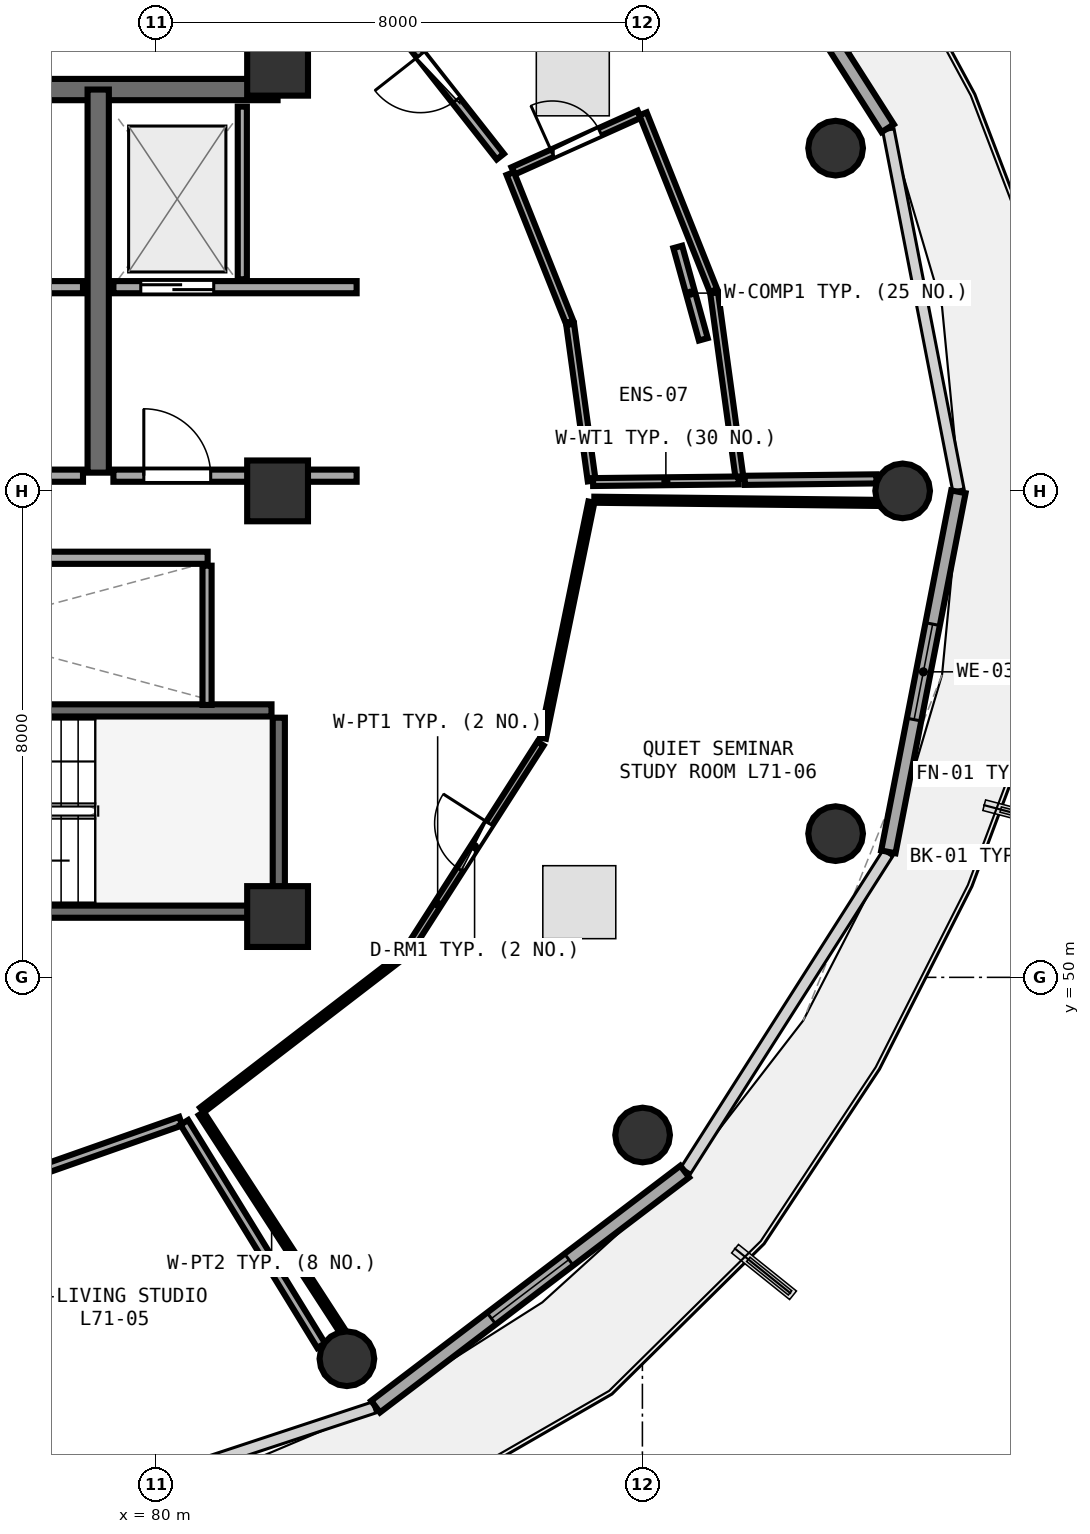
"""IFC4 building model, lengths in metres.
Left out: names, types, materials, properties, quantities, classifications, styles, units other than length and angle.
Written with IfcOpenShell. Run it as: python <this file> out.ifc"""

import sys

from ifc_helpers import new_model, si_unit, direction, frame, frame_2d, origin, origin_2d, place, context, subcontext, project, spatial, rectangle, circle, extrude, element, fill, save


model = new_model("IFC4")
c1 = context("Model", 3, precision=1e-05, world=origin(), true_north=direction((0.0, 1.0)))
c2 = subcontext(c1, "Body", "Model", "MODEL_VIEW")
j1 = project(units=[si_unit("LENGTHUNIT", "METRE"), si_unit("PLANEANGLEUNIT", "RADIAN")], contexts=[c1])
p1 = place(None, origin())
s1 = spatial("IfcSite", under=j1, at=p1, CompositionType="ELEMENT")
p2 = place(p1, origin())
s2 = spatial("IfcBuilding", under=s1, at=p2, CompositionType="ELEMENT")
p3 = place(p2, frame((0.0, 0.0, 278.7)))
s3 = spatial("IfcBuildingStorey", under=s2, at=p3, CompositionType="ELEMENT", Elevation=278.7)
for number, where, z_axis, x_axis in (
    (1, (82.0, 51.0, 0.0), (0.0, 0.0, 1.0), (1.0, 0.0, 0.0)),
    (2, (82.0, 58.0, 0.0), (0.0, 0.0, 1.0), (1.0, 0.0, 0.0)),
    (3, (82.0, 65.0, 0.0), (0.0, 0.0, 1.0), (1.0, 0.0, 0.0)),
):
    element("IfcColumn", number, at=place(p3, frame(where, z_axis=z_axis, x_axis=x_axis)), inside=s3, PredefinedType="PILASTER", context=c2, shape_type="SweptSolid", body=[
        extrude(rectangle(XDim=1.0, YDim=1.0, at=origin_2d()), origin(), (0.0, 0.0, 1.0), 3.75),
    ])
for number, where, z_axis, x_axis in (
    (4, (92.28, 58.0, 0.0), (0.0, 0.0, 1.0), (1.0, 0.0, 0.0)),
    (5, (91.177, 63.636, 0.0), (0.0, 0.0, 1.0), (1.0, 0.0, 0.0)),
    (6, (83.14, 43.728, 0.0), (0.0, 0.0, 1.0), (1.0, 0.0, 0.0)),
    (7, (88.003, 47.407, 0.0), (0.0, 0.0, 1.0), (1.0, 0.0, 0.0)),
    (8, (91.177, 52.364, 0.0), (0.0, 0.0, 1.0), (1.0, 0.0, 0.0)),
):
    element("IfcColumn", number, at=place(p3, frame(where, z_axis=z_axis, x_axis=x_axis)), inside=s3, PredefinedType="COLUMN", context=c2, shape_type="SweptSolid", body=[
        extrude(circle(Radius=0.45, at=origin_2d()), origin(), (0.0, 0.0, 1.0), 3.75),
    ])
p4 = place(p3, frame((92.034, 63.964, 0.0), z_axis=(0.0, 0.0, 1.0), x_axis=(-0.537271968456, 0.843409053728, 0.0)))
e9 = element("IfcWall", 9, at=p4, inside=s3, PredefinedType="SOLIDWALL", context=c2, shape_type="SweptSolid", body=[
    extrude(rectangle(XDim=6.175, YDim=0.24, at=frame_2d((3.087, 0.0))), origin(), (0.0, 0.0, 1.0), 3.475),
])
p5 = place(p4, frame((2.613, 0.0, 0.0)))
e10 = element("IfcOpeningElement", 10, at=p5, cuts=e9, PredefinedType="OPENING", context=c2, shape_type="SweptSolid", body=[
    extrude(rectangle(XDim=0.95, YDim=2.1, at=frame_2d((0.475, 1.05))), frame((0.0, 0.13, 0.0), z_axis=(0.0, -1.0, 0.0), x_axis=(1.0, 0.0, 0.0)), (0.0, 0.0, 1.0), 0.26),
])
p6 = place(p4, frame((3.913, 0.0, 0.85)))
e11 = element("IfcOpeningElement", 11, at=p6, cuts=e9, PredefinedType="OPENING", context=c2, shape_type="SweptSolid", body=[
    extrude(rectangle(XDim=1.2, YDim=1.45, at=frame_2d((0.6, 0.725))), frame((0.0, 0.13, 0.0), z_axis=(0.0, -1.0, 0.0), x_axis=(1.0, 0.0, 0.0)), (0.0, 0.0, 1.0), 0.26),
])
p7 = place(p3, frame((83.612, 42.94, 0.0), z_axis=(0.0, 0.0, 1.0), x_axis=(0.796010444211, 0.605282886514, 0.0)))
e12 = element("IfcWall", 12, at=p7, inside=s3, PredefinedType="SOLIDWALL", context=c2, shape_type="SweptSolid", body=[
    extrude(rectangle(XDim=6.387, YDim=0.24, at=frame_2d((3.194, 0.0))), origin(), (0.0, 0.0, 1.0), 3.475),
])
p8 = place(p7, frame((2.394, 0.0, 0.85)))
e13 = element("IfcOpeningElement", 13, at=p8, cuts=e12, PredefinedType="OPENING", context=c2, shape_type="SweptSolid", body=[
    extrude(rectangle(XDim=1.6, YDim=1.45, at=frame_2d((0.8, 0.725))), frame((0.0, 0.13, 0.0), z_axis=(0.0, -1.0, 0.0), x_axis=(1.0, 0.0, 0.0)), (0.0, 0.0, 1.0), 0.26),
])
p9 = place(p3, frame((92.045, 52.063, 0.0), z_axis=(0.0, 0.0, 1.0), x_axis=(0.190969309115, 0.981596008028, 0.0)))
e14 = element("IfcWall", 14, at=p9, inside=s3, PredefinedType="SOLIDWALL", context=c2, shape_type="SweptSolid", body=[
    extrude(rectangle(XDim=6.033, YDim=0.24, at=frame_2d((3.017, 0.0))), origin(), (0.0, 0.0, 1.0), 3.475),
])
p10 = place(p9, frame((2.216, 0.0, 0.85)))
e15 = element("IfcOpeningElement", 15, at=p10, cuts=e14, PredefinedType="OPENING", context=c2, shape_type="SweptSolid", body=[
    extrude(rectangle(XDim=1.6, YDim=1.45, at=frame_2d((0.8, 0.725))), frame((0.0, 0.13, 0.0), z_axis=(0.0, -1.0, 0.0), x_axis=(1.0, 0.0, 0.0)), (0.0, 0.0, 1.0), 0.26),
])
p11 = place(p3, frame((74.0, 51.08, 0.0), z_axis=(0.0, 0.0, 1.0), x_axis=(1.0, 0.0, 0.0)))
e16 = element("IfcWall", 16, at=p11, inside=s3, PredefinedType="SHEAR", context=c2, shape_type="SweptSolid", body=[
    extrude(rectangle(XDim=7.9, YDim=0.2, at=frame_2d((3.95, 0.0))), origin(), (0.0, 0.0, 1.0), 3.49),
])
p12 = place(p11, frame((1.12, 0.0, 0.0)))
e17 = element("IfcOpeningElement", 17, at=p12, cuts=e16, PredefinedType="OPENING", context=c2, shape_type="SweptSolid", body=[
    extrude(rectangle(XDim=1.05, YDim=2.1, at=frame_2d((0.525, 1.05))), frame((0.0, 0.11, 0.0), z_axis=(0.0, -1.0, 0.0), x_axis=(1.0, 0.0, 0.0)), (0.0, 0.0, 1.0), 0.22),
])
p13 = place(p3, frame((82.02, 51.2, 0.0), z_axis=(0.0, 0.0, 1.0), x_axis=(0.0, 1.0, 0.0)))
e18 = element("IfcWall", 18, at=p13, inside=s3, PredefinedType="SHEAR", context=c2, shape_type="SweptSolid", body=[
    extrude(rectangle(XDim=3.07, YDim=0.2, at=frame_2d((1.535, 0.0))), origin(), (0.0, 0.0, 1.0), 3.49),
])
p14 = place(p3, frame((81.9, 54.39, 0.0), z_axis=(0.0, 0.0, 1.0), x_axis=(-1.0, 0.0, 0.0)))
e19 = element("IfcWall", 19, at=p14, inside=s3, PredefinedType="SHEAR", context=c2, shape_type="SweptSolid", body=[
    extrude(rectangle(XDim=8.46, YDim=0.2, at=frame_2d((4.23, 0.0))), origin(), (0.0, 0.0, 1.0), 3.49),
])
p15 = place(p3, frame((74.0, 64.6, 0.0), z_axis=(0.0, 0.0, 1.0), x_axis=(1.0, 0.0, 0.0)))
e20 = element("IfcWall", 20, at=p15, inside=s3, PredefinedType="SHEAR", context=c2, shape_type="SweptSolid", body=[
    extrude(rectangle(XDim=8.0, YDim=0.35, at=frame_2d((4.0, 0.0))), origin(), (0.0, 0.0, 1.0), 3.49),
])
p16 = place(p3, frame((79.05, 58.3, 0.0), z_axis=(0.0, 0.0, 1.0), x_axis=(0.0, 1.0, 0.0)))
e21 = element("IfcWall", 21, at=p16, inside=s3, PredefinedType="SHEAR", context=c2, shape_type="SweptSolid", body=[
    extrude(rectangle(XDim=6.3, YDim=0.35, at=frame_2d((3.15, 0.0))), origin(), (0.0, 0.0, 1.0), 3.49),
])
p17 = place(p3, frame((74.2, 61.35, 0.0), z_axis=(0.0, 0.0, 1.0), x_axis=(1.0, 0.0, 0.0)))
e22 = element("IfcWall", 22, at=p17, inside=s3, PredefinedType="SOLIDWALL", context=c2, shape_type="SweptSolid", body=[
    extrude(rectangle(XDim=4.6, YDim=0.2, at=frame_2d((2.3, 0.0))), origin(), (0.0, 0.0, 1.0), 3.48),
])
p18 = place(p17, frame((0.52, 0.0, 0.0)))
e23 = element("IfcOpeningElement", 23, at=p18, cuts=e22, PredefinedType="OPENING", context=c2, shape_type="SweptSolid", body=[
    extrude(rectangle(XDim=1.2, YDim=2.15, at=frame_2d((0.6, 1.075))), frame((0.0, 0.11, 0.0), z_axis=(0.0, -1.0, 0.0), x_axis=(1.0, 0.0, 0.0)), (0.0, 0.0, 1.0), 0.22),
])
p19 = place(p3, frame((79.3, 61.35, 0.0), z_axis=(0.0, 0.0, 1.0), x_axis=(1.0, 0.0, 0.0)))
e24 = element("IfcWall", 24, at=p19, inside=s3, PredefinedType="SOLIDWALL", context=c2, shape_type="SweptSolid", body=[
    extrude(rectangle(XDim=4.0, YDim=0.2, at=frame_2d((2.0, 0.0))), origin(), (0.0, 0.0, 1.0), 2.775),
])
p20 = place(p19, frame((0.45, 0.0, 0.0)))
e25 = element("IfcOpeningElement", 25, at=p20, cuts=e24, PredefinedType="OPENING", context=c2, shape_type="SweptSolid", body=[
    extrude(rectangle(XDim=1.2, YDim=2.15, at=frame_2d((0.6, 1.075))), frame((0.0, 0.11, 0.0), z_axis=(0.0, -1.0, 0.0), x_axis=(1.0, 0.0, 0.0)), (0.0, 0.0, 1.0), 0.22),
])
p21 = place(p3, frame((81.42, 61.48, 0.0), z_axis=(0.0, 0.0, 1.0), x_axis=(0.0, 1.0, 0.0)))
e26 = element("IfcWall", 26, at=p21, inside=s3, PredefinedType="PARTITIONING", context=c2, shape_type="SweptSolid", body=[
    extrude(rectangle(XDim=2.84, YDim=0.15, at=frame_2d((1.42, 0.0))), origin(), (0.0, 0.0, 1.0), 3.48),
])
p22 = place(p3, frame((74.2, 58.25, 0.0), z_axis=(0.0, 0.0, 1.0), x_axis=(1.0, 0.0, 0.0)))
e27 = element("IfcWall", 27, at=p22, inside=s3, PredefinedType="SOLIDWALL", context=c2, shape_type="SweptSolid", body=[
    extrude(rectangle(XDim=4.6, YDim=0.2, at=frame_2d((2.3, 0.0))), origin(), (0.0, 0.0, 1.0), 3.48),
])
p23 = place(p22, frame((1.8, 0.0, 0.0)))
e28 = element("IfcOpeningElement", 28, at=p23, cuts=e27, PredefinedType="OPENING", context=c2, shape_type="SweptSolid", body=[
    extrude(rectangle(XDim=1.1, YDim=2.1, at=frame_2d((0.55, 1.05))), frame((0.0, 0.11, 0.0), z_axis=(0.0, -1.0, 0.0), x_axis=(1.0, 0.0, 0.0)), (0.0, 0.0, 1.0), 0.22),
])
p24 = place(p3, frame((79.3, 58.25, 0.0), z_axis=(0.0, 0.0, 1.0), x_axis=(1.0, 0.0, 0.0)))
e29 = element("IfcWall", 29, at=p24, inside=s3, PredefinedType="SOLIDWALL", context=c2, shape_type="SweptSolid", body=[
    extrude(rectangle(XDim=4.0, YDim=0.2, at=frame_2d((2.0, 0.0))), origin(), (0.0, 0.0, 1.0), 2.775),
])
p25 = place(p24, frame((0.5, 0.0, 0.0)))
e30 = element("IfcOpeningElement", 30, at=p25, cuts=e29, PredefinedType="OPENING", context=c2, shape_type="SweptSolid", body=[
    extrude(rectangle(XDim=1.1, YDim=2.1, at=frame_2d((0.55, 1.05))), frame((0.0, 0.11, 0.0), z_axis=(0.0, -1.0, 0.0), x_axis=(1.0, 0.0, 0.0)), (0.0, 0.0, 1.0), 0.22),
])
p26 = place(p3, frame((72.45, 56.9, 0.0), z_axis=(0.0, 0.0, 1.0), x_axis=(1.0, 0.0, 0.0)))
e31 = element("IfcWall", 31, at=p26, inside=s3, PredefinedType="SOLIDWALL", context=c2, shape_type="SweptSolid", body=[
    extrude(rectangle(XDim=8.4, YDim=0.2, at=frame_2d((4.2, 0.0))), origin(), (0.0, 0.0, 1.0), 3.48),
])
p27 = place(p26, frame((0.4, 0.0, 0.0)))
e32 = element("IfcOpeningElement", 32, at=p27, cuts=e31, PredefinedType="OPENING", context=c2, shape_type="SweptSolid", body=[
    extrude(rectangle(XDim=1.1, YDim=2.1, at=frame_2d((0.55, 1.05))), frame((0.0, 0.11, 0.0), z_axis=(0.0, -1.0, 0.0), x_axis=(1.0, 0.0, 0.0)), (0.0, 0.0, 1.0), 0.22),
])
p28 = place(p26, frame((2.4, 0.0, 0.0)))
e33 = element("IfcOpeningElement", 33, at=p28, cuts=e31, PredefinedType="OPENING", context=c2, shape_type="SweptSolid", body=[
    extrude(rectangle(XDim=1.1, YDim=2.1, at=frame_2d((0.55, 1.05))), frame((0.0, 0.11, 0.0), z_axis=(0.0, -1.0, 0.0), x_axis=(1.0, 0.0, 0.0)), (0.0, 0.0, 1.0), 0.22),
])
p29 = place(p3, frame((80.84, 54.48, 0.0), z_axis=(0.0, 0.0, 1.0), x_axis=(0.0, 1.0, 0.0)))
e34 = element("IfcWall", 34, at=p29, inside=s3, PredefinedType="PARTITIONING", context=c2, shape_type="SweptSolid", body=[
    extrude(rectangle(XDim=2.29, YDim=0.15, at=frame_2d((1.145, 0.0))), origin(), (0.0, 0.0, 1.0), 3.48),
])
p30 = place(p3, frame((84.156, 50.458, 0.0), z_axis=(0.0, 0.0, 1.0), x_axis=(0.539324099435, 0.842098281538, 0.0)))
e35 = element("IfcWall", 35, at=p30, inside=s3, PredefinedType="PARTITIONING", context=c2, shape_type="SweptSolid", body=[
    extrude(rectangle(XDim=4.022, YDim=0.12, at=frame_2d((2.011, 0.0))), origin(), (0.0, 0.0, 1.0), 3.075),
])
p31 = place(p30, frame((1.561, 0.0, 0.0)))
e36 = element("IfcOpeningElement", 36, at=p31, cuts=e35, PredefinedType="OPENING", context=c2, shape_type="SweptSolid", body=[
    extrude(rectangle(XDim=0.9, YDim=2.08, at=frame_2d((0.45, 1.04))), frame((0.0, 0.07, 0.0), z_axis=(0.0, -1.0, 0.0), x_axis=(1.0, 0.0, 0.0)), (0.0, 0.0, 1.0), 0.14),
])
p32 = place(p3, frame((85.874, 63.263, 0.0), z_axis=(0.0, 0.0, 1.0), x_axis=(0.912228594958, 0.409681572127, 0.0)))
e37 = element("IfcWall", 37, at=p32, inside=s3, PredefinedType="PLUMBINGWALL", context=c2, shape_type="SweptSolid", body=[
    extrude(rectangle(XDim=2.274, YDim=0.13, at=frame_2d((1.137, 0.0))), origin(), (0.0, 0.0, 1.0), 3.075),
])
p33 = place(p32, frame((0.707, 0.0, 0.0)))
e38 = element("IfcOpeningElement", 38, at=p33, cuts=e37, PredefinedType="OPENING", context=c2, shape_type="SweptSolid", body=[
    extrude(rectangle(XDim=0.86, YDim=2.05, at=frame_2d((0.43, 1.025))), frame((0.0, 0.075, 0.0), z_axis=(0.0, -1.0, 0.0), x_axis=(1.0, 0.0, 0.0)), (0.0, 0.0, 1.0), 0.15),
])
p34 = place(p3, frame((85.663, 63.497, 0.0), z_axis=(0.0, 0.0, 1.0), x_axis=(-0.618216128683, 0.786008154052, 0.0)))
e39 = element("IfcWall", 39, at=p34, inside=s3, PredefinedType="PARTITIONING", context=c2, shape_type="SweptSolid", body=[
    extrude(rectangle(XDim=3.306, YDim=0.15, at=frame_2d((1.653, 0.0))), origin(), (0.0, 0.0, 1.0), 3.075),
])
p35 = place(p34, frame((1.178, 0.0, 0.0)))
e40 = element("IfcOpeningElement", 40, at=p35, cuts=e39, PredefinedType="OPENING", context=c2, shape_type="SweptSolid", body=[
    extrude(rectangle(XDim=0.95, YDim=2.08, at=frame_2d((0.475, 1.04))), frame((0.0, 0.085, 0.0), z_axis=(0.0, -1.0, 0.0), x_axis=(1.0, 0.0, 0.0)), (0.0, 0.0, 1.0), 0.17),
])
p36 = place(p3, frame((77.072, 46.462, 0.0), z_axis=(0.0, 0.0, 1.0), x_axis=(0.943334007166, 0.331844769319, 0.0)))
e41 = element("IfcWall", 41, at=p36, inside=s3, PredefinedType="PARTITIONING", context=c2, shape_type="SweptSolid", body=[
    extrude(rectangle(XDim=3.536, YDim=0.15, at=frame_2d((1.768, 0.0))), origin(), (0.0, 0.0, 1.0), 3.48),
])
p37 = place(p3, frame((80.466, 47.615, 0.0), z_axis=(0.0, 0.0, 1.0), x_axis=(0.522784059663, -0.852465147066, 0.0)))
e42 = element("IfcWall", 42, at=p37, inside=s3, PredefinedType="PARTITIONING", context=c2, shape_type="SweptSolid", body=[
    extrude(rectangle(XDim=4.306, YDim=0.15, at=frame_2d((2.153, 0.0))), origin(), (0.0, 0.0, 1.0), 3.175),
])
p38 = place(p3, frame((80.756, 47.818, 0.0), z_axis=(0.0, 0.0, 1.0), x_axis=(0.792820246885, 0.609455540733, 0.0)))
e43 = element("IfcWall", 43, at=p38, inside=s3, PredefinedType="PARTITIONING", context=c2, shape_type="SweptSolid", body=[
    extrude(rectangle(XDim=4.207, YDim=0.1, at=frame_2d((2.104, 0.0))), origin(), (0.0, 0.0, 1.0), 3.075),
])
p39 = place(p3, frame((86.365, 53.934, 0.0), z_axis=(0.0, 0.0, 1.0), x_axis=(0.200853183429, 0.979621354762, 0.0)))
e44 = element("IfcWall", 44, at=p39, inside=s3, PredefinedType="PARTITIONING", context=c2, shape_type="SweptSolid", body=[
    extrude(rectangle(XDim=3.963, YDim=0.1, at=frame_2d((1.981, 0.0))), origin(), (0.0, 0.0, 1.0), 3.48),
])
p40 = place(p3, frame((87.209, 57.854, 0.0), z_axis=(0.0, 0.0, 1.0), x_axis=(0.999937174585, -0.01120923205, 0.0)))
e45 = element("IfcWall", 45, at=p40, inside=s3, PredefinedType="PARTITIONING", context=c2, shape_type="SweptSolid", body=[
    extrude(rectangle(XDim=4.639, YDim=0.1, at=frame_2d((2.32, 0.0))), origin(), (0.0, 0.0, 1.0), 3.075),
])
p41 = place(p3, frame((83.058, 44.196, 0.0), z_axis=(0.0, 0.0, 1.0), x_axis=(-0.544234825024, 0.838932926539, 0.0)))
e46 = element("IfcWall", 46, at=p41, inside=s3, PredefinedType="PARTITIONING", context=c2, shape_type="SweptSolid", body=[
    extrude(rectangle(XDim=4.249, YDim=0.1, at=frame_2d((2.125, 0.0))), origin(), (0.0, 0.0, 1.0), 3.075),
])
p42 = place(p3, frame((87.166, 58.165, 0.0), z_axis=(0.0, 0.0, 1.0), x_axis=(-0.13640850471, 0.990652673667, 0.0)))
e47 = element("IfcWall", 47, at=p42, inside=s3, PredefinedType="PLUMBINGWALL", context=c2, shape_type="SweptSolid", body=[
    extrude(rectangle(XDim=2.599, YDim=0.13, at=frame_2d((1.299, 0.0))), origin(), (0.0, 0.0, 1.0), 3.075),
])
p43 = place(p3, frame((86.802, 60.778, 0.0), z_axis=(0.0, 0.0, 1.0), x_axis=(-0.370846314423, 0.92869425059, 0.0)))
e48 = element("IfcWall", 48, at=p43, inside=s3, PredefinedType="PLUMBINGWALL", context=c2, shape_type="SweptSolid", body=[
    extrude(rectangle(XDim=2.629, YDim=0.13, at=frame_2d((1.315, 0.0))), origin(), (0.0, 0.0, 1.0), 3.48),
])
p44 = place(p3, frame((88.01, 64.2, 0.0), z_axis=(0.0, 0.0, 1.0), x_axis=(0.370529396103, -0.928820739768, 0.0)))
e49 = element("IfcWall", 49, at=p44, inside=s3, PredefinedType="PLUMBINGWALL", context=c2, shape_type="SweptSolid", body=[
    extrude(rectangle(XDim=3.128, YDim=0.13, at=frame_2d((1.564, 0.0))), origin(), (0.0, 0.0, 1.0), 3.075),
])
p45 = place(p3, frame((89.18, 61.256, 0.0), z_axis=(0.0, 0.0, 1.0), x_axis=(0.13600432659, -0.990708243202, 0.0)))
e50 = element("IfcWall", 50, at=p45, inside=s3, PredefinedType="PLUMBINGWALL", context=c2, shape_type="SweptSolid", body=[
    extrude(rectangle(XDim=3.093, YDim=0.13, at=frame_2d((1.546, 0.0))), origin(), (0.0, 0.0, 1.0), 3.48),
])
p46 = place(p3, frame((89.583, 58.172, 0.0), z_axis=(0.0, 0.0, 1.0), x_axis=(-0.999938226959, -0.011114956836, 0.0)))
e51 = element("IfcWall", 51, at=p46, inside=s3, PredefinedType="PLUMBINGWALL", context=c2, shape_type="SweptSolid", body=[
    extrude(rectangle(XDim=2.394, YDim=0.13, at=frame_2d((1.197, 0.0))), origin(), (0.0, 0.0, 1.0), 3.075),
])
p47 = place(p3, frame((91.848, 58.198, 0.0), z_axis=(0.0, 0.0, 1.0), x_axis=(-0.999937677283, -0.011164297964, 0.0)))
e52 = element("IfcWall", 52, at=p47, inside=s3, PredefinedType="PARTITIONING", context=c2, shape_type="SweptSolid", body=[
    extrude(rectangle(XDim=2.165, YDim=0.15, at=frame_2d((1.083, 0.0))), origin(), (0.0, 0.0, 1.0), 3.075),
])
p48 = place(p3, frame((89.002, 60.492, 0.0), z_axis=(0.0, 0.0, 1.0), x_axis=(-0.266469764124, 0.963843278136, 0.0)))
e53 = element("IfcWall", 53, at=p48, inside=s3, PredefinedType="PARTITIONING", context=c2, shape_type="SweptSolid", body=[
    extrude(rectangle(XDim=1.577, YDim=0.15, at=frame_2d((0.789, 0.0))), origin(), (0.0, 0.0, 1.0), 3.48),
])
p49 = place(p8, origin())
e54 = element("IfcWindow", 54, at=p49, inside=s3, PartitioningType="SINGLE_PANEL", PredefinedType="WINDOW", context=c2, shape_type="SweptSolid", body=[
    extrude(rectangle(XDim=1.6, YDim=1.45, at=frame_2d((0.8, 0.725))), frame((0.0, 0.03, 0.0), z_axis=(0.0, -1.0, 0.0), x_axis=(1.0, 0.0, 0.0)), (0.0, 0.0, 1.0), 0.06),
])
fill(e13, e54)
p50 = place(p10, origin())
e55 = element("IfcWindow", 55, at=p50, inside=s3, PartitioningType="SINGLE_PANEL", PredefinedType="WINDOW", context=c2, shape_type="SweptSolid", body=[
    extrude(rectangle(XDim=1.6, YDim=1.45, at=frame_2d((0.8, 0.725))), frame((0.0, 0.03, 0.0), z_axis=(0.0, -1.0, 0.0), x_axis=(1.0, 0.0, 0.0)), (0.0, 0.0, 1.0), 0.06),
])
fill(e15, e55)
p51 = place(p20, origin())
e56 = element("IfcDoor", 56, at=p51, inside=s3, OperationType="DOUBLE_DOOR_SLIDING", PredefinedType="DOOR", context=c2, shape_type="SweptSolid", body=[
    extrude(rectangle(XDim=1.2, YDim=2.15, at=frame_2d((0.6, 1.075))), frame((0.0, 0.025, 0.0), z_axis=(0.0, -1.0, 0.0), x_axis=(1.0, 0.0, 0.0)), (0.0, 0.0, 1.0), 0.05),
])
fill(e25, e56)
p52 = place(p25, frame((1.1, 0.0, 0.0), z_axis=(0.0, 0.0, 1.0), x_axis=(-1.0, 0.0, 0.0)))
e57 = element("IfcDoor", 57, at=p52, inside=s3, OperationType="SINGLE_SWING_RIGHT", PredefinedType="DOOR", context=c2, shape_type="SweptSolid", body=[
    extrude(rectangle(XDim=1.1, YDim=2.1, at=frame_2d((0.55, 1.05))), frame((0.0, 0.025, 0.0), z_axis=(0.0, -1.0, 0.0), x_axis=(1.0, 0.0, 0.0)), (0.0, 0.0, 1.0), 0.05),
])
fill(e30, e57)
p53 = place(p31, origin())
e58 = element("IfcDoor", 58, at=p53, inside=s3, OperationType="SINGLE_SWING_RIGHT", PredefinedType="DOOR", context=c2, shape_type="SweptSolid", body=[
    extrude(rectangle(XDim=0.9, YDim=2.08, at=frame_2d((0.45, 1.04))), frame((0.0, 0.025, 0.0), z_axis=(0.0, -1.0, 0.0), x_axis=(1.0, 0.0, 0.0)), (0.0, 0.0, 1.0), 0.05),
])
fill(e36, e58)
p54 = place(p33, origin())
e59 = element("IfcDoor", 59, at=p54, inside=s3, OperationType="SINGLE_SWING_LEFT", PredefinedType="DOOR", context=c2, shape_type="SweptSolid", body=[
    extrude(rectangle(XDim=0.86, YDim=2.05, at=frame_2d((0.43, 1.025))), frame((0.0, 0.025, 0.0), z_axis=(0.0, -1.0, 0.0), x_axis=(1.0, 0.0, 0.0)), (0.0, 0.0, 1.0), 0.05),
])
fill(e38, e59)
p55 = place(p35, origin())
e60 = element("IfcDoor", 60, at=p55, inside=s3, OperationType="SINGLE_SWING_RIGHT", PredefinedType="DOOR", context=c2, shape_type="SweptSolid", body=[
    extrude(rectangle(XDim=0.95, YDim=2.08, at=frame_2d((0.475, 1.04))), frame((0.0, 0.025, 0.0), z_axis=(0.0, -1.0, 0.0), x_axis=(1.0, 0.0, 0.0)), (0.0, 0.0, 1.0), 0.05),
])
fill(e40, e60)
save(model, sys.argv[1])
